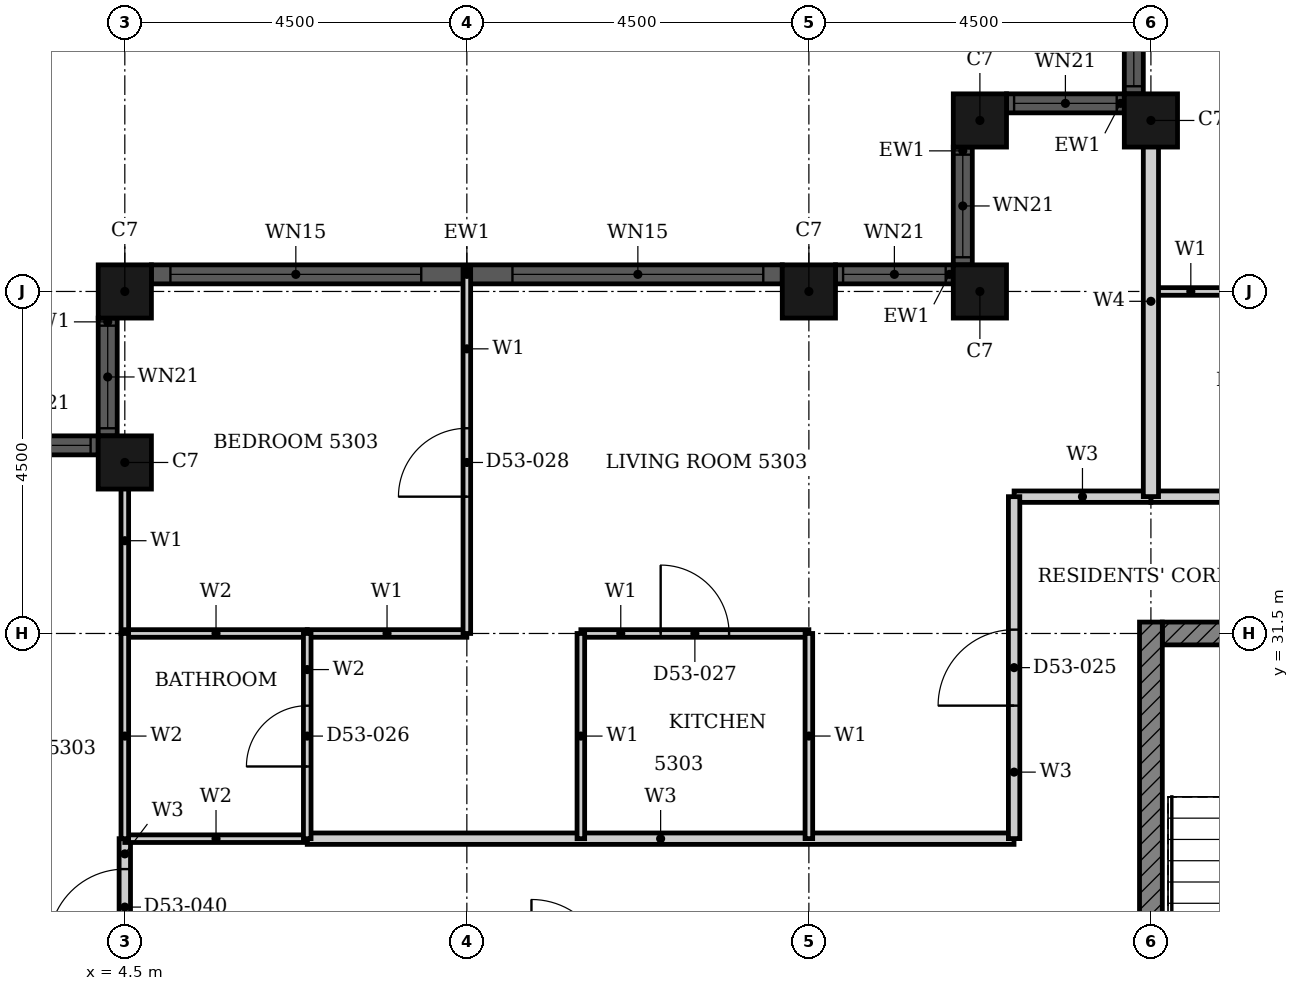
"""IFC4 building model, lengths in metres.
Left out: names, types, materials, properties, quantities, classifications, styles, units other than length and angle.
Written with IfcOpenShell. Run it as: python <this file> out.ifc"""

import sys

from ifc_helpers import new_model, si_unit, direction, frame, frame_2d, origin, origin_2d, place, context, subcontext, project, spatial, rectangle, hollow_rectangle, extrude, element, fill, save


model = new_model("IFC4")
c1 = context("Model", 3, precision=1e-05, world=origin(), true_north=direction((0.0, 1.0)))
c2 = subcontext(c1, "Body", "Model", "MODEL_VIEW")
j1 = project(units=[si_unit("LENGTHUNIT", "METRE"), si_unit("PLANEANGLEUNIT", "RADIAN")], contexts=[c1])
p1 = place(None, origin())
s1 = spatial("IfcSite", under=j1, at=p1, CompositionType="ELEMENT")
p2 = place(p1, origin())
s2 = spatial("IfcBuilding", under=s1, at=p2, CompositionType="ELEMENT")
p3 = place(p2, frame((0.0, 0.0, 210.9)))
s3 = spatial("IfcBuildingStorey", under=s2, at=p3, CompositionType="ELEMENT", Elevation=210.9)
for number, where, z_axis, x_axis in (
    (1, (18.0, 38.25, 0.0), (0.0, 0.0, 1.0), (1.0, 0.0, 0.0)),
    (2, (15.75, 38.25, 0.0), (0.0, 0.0, 1.0), (1.0, 0.0, 0.0)),
    (3, (15.75, 36.0, 0.0), (0.0, 0.0, 1.0), (1.0, 0.0, 0.0)),
    (4, (13.5, 36.0, 0.0), (0.0, 0.0, 1.0), (1.0, 0.0, 0.0)),
    (5, (4.5, 36.0, 0.0), (0.0, 0.0, 1.0), (1.0, 0.0, 0.0)),
    (6, (4.5, 33.75, 0.0), (0.0, 0.0, 1.0), (1.0, 0.0, 0.0)),
):
    element("IfcColumn", number, at=place(p3, frame(where, z_axis=z_axis, x_axis=x_axis)), inside=s3, PredefinedType="COLUMN", context=c2, shape_type="SweptSolid", body=[
        extrude(hollow_rectangle(XDim=0.7, YDim=0.7, WallThickness=0.022, at=origin_2d()), origin(), (0.0, 0.0, 1.0), 3.7),
    ])
p4 = place(p3, frame((17.775, 40.15, 0.0), z_axis=(0.0, 0.0, 1.0), x_axis=(0.0, -1.0, 0.0)))
e7 = element("IfcWall", 7, at=p4, inside=s3, PredefinedType="SOLIDWALL", context=c2, shape_type="SweptSolid", body=[
    extrude(rectangle(XDim=1.55, YDim=0.25, at=frame_2d((0.775, 0.0))), origin(), (0.0, 0.0, 1.0), 3.7),
])
p5 = place(p4, frame((0.1, 0.0, 0.9)))
e8 = element("IfcOpeningElement", 8, at=p5, cuts=e7, PredefinedType="OPENING", context=c2, shape_type="SweptSolid", body=[
    extrude(rectangle(XDim=1.35, YDim=1.85, at=frame_2d((0.675, 0.925))), frame((0.0, 0.135, 0.0), z_axis=(0.0, -1.0, 0.0), x_axis=(1.0, 0.0, 0.0)), (0.0, 0.0, 1.0), 0.27),
])
p6 = place(p3, frame((17.65, 38.475, 0.0), z_axis=(0.0, 0.0, 1.0), x_axis=(-1.0, 0.0, 0.0)))
e9 = element("IfcWall", 9, at=p6, inside=s3, PredefinedType="SOLIDWALL", context=c2, shape_type="SweptSolid", body=[
    extrude(rectangle(XDim=1.55, YDim=0.25, at=frame_2d((0.775, 0.0))), origin(), (0.0, 0.0, 1.0), 3.7),
])
p7 = place(p6, frame((0.1, 0.0, 0.9)))
e10 = element("IfcOpeningElement", 10, at=p7, cuts=e9, PredefinedType="OPENING", context=c2, shape_type="SweptSolid", body=[
    extrude(rectangle(XDim=1.35, YDim=1.85, at=frame_2d((0.675, 0.925))), frame((0.0, 0.135, 0.0), z_axis=(0.0, -1.0, 0.0), x_axis=(1.0, 0.0, 0.0)), (0.0, 0.0, 1.0), 0.27),
])
p8 = place(p3, frame((15.525, 37.9, 0.0), z_axis=(0.0, 0.0, 1.0), x_axis=(0.0, -1.0, 0.0)))
e11 = element("IfcWall", 11, at=p8, inside=s3, PredefinedType="SOLIDWALL", context=c2, shape_type="SweptSolid", body=[
    extrude(rectangle(XDim=1.55, YDim=0.25, at=frame_2d((0.775, 0.0))), origin(), (0.0, 0.0, 1.0), 3.7),
])
p9 = place(p8, frame((0.1, 0.0, 0.9)))
e12 = element("IfcOpeningElement", 12, at=p9, cuts=e11, PredefinedType="OPENING", context=c2, shape_type="SweptSolid", body=[
    extrude(rectangle(XDim=1.35, YDim=1.85, at=frame_2d((0.675, 0.925))), frame((0.0, 0.135, 0.0), z_axis=(0.0, -1.0, 0.0), x_axis=(1.0, 0.0, 0.0)), (0.0, 0.0, 1.0), 0.27),
])
p10 = place(p3, frame((15.4, 36.225, 0.0), z_axis=(0.0, 0.0, 1.0), x_axis=(-1.0, 0.0, 0.0)))
e13 = element("IfcWall", 13, at=p10, inside=s3, PredefinedType="SOLIDWALL", context=c2, shape_type="SweptSolid", body=[
    extrude(rectangle(XDim=1.55, YDim=0.25, at=frame_2d((0.775, 0.0))), origin(), (0.0, 0.0, 1.0), 3.7),
])
p11 = place(p10, frame((0.1, 0.0, 0.9)))
e14 = element("IfcOpeningElement", 14, at=p11, cuts=e13, PredefinedType="OPENING", context=c2, shape_type="SweptSolid", body=[
    extrude(rectangle(XDim=1.35, YDim=1.85, at=frame_2d((0.675, 0.925))), frame((0.0, 0.135, 0.0), z_axis=(0.0, -1.0, 0.0), x_axis=(1.0, 0.0, 0.0)), (0.0, 0.0, 1.0), 0.27),
])
p12 = place(p3, frame((13.15, 36.225, 0.0), z_axis=(0.0, 0.0, 1.0), x_axis=(-1.0, 0.0, 0.0)))
e15 = element("IfcWall", 15, at=p12, inside=s3, PredefinedType="SOLIDWALL", context=c2, shape_type="SweptSolid", body=[
    extrude(rectangle(XDim=8.3, YDim=0.25, at=frame_2d((4.15, 0.0))), origin(), (0.0, 0.0, 1.0), 3.7),
])
p13 = place(p12, frame((0.25, 0.0, 0.45)))
e16 = element("IfcOpeningElement", 16, at=p13, cuts=e15, PredefinedType="OPENING", context=c2, shape_type="SweptSolid", body=[
    extrude(rectangle(XDim=3.3, YDim=2.3, at=frame_2d((1.65, 1.15))), frame((0.0, 0.135, 0.0), z_axis=(0.0, -1.0, 0.0), x_axis=(1.0, 0.0, 0.0)), (0.0, 0.0, 1.0), 0.27),
])
p14 = place(p12, frame((4.75, 0.0, 0.45)))
e17 = element("IfcOpeningElement", 17, at=p14, cuts=e15, PredefinedType="OPENING", context=c2, shape_type="SweptSolid", body=[
    extrude(rectangle(XDim=3.3, YDim=2.3, at=frame_2d((1.65, 1.15))), frame((0.0, 0.135, 0.0), z_axis=(0.0, -1.0, 0.0), x_axis=(1.0, 0.0, 0.0)), (0.0, 0.0, 1.0), 0.27),
])
p15 = place(p3, frame((4.275, 35.65, 0.0), z_axis=(0.0, 0.0, 1.0), x_axis=(0.0, -1.0, 0.0)))
e18 = element("IfcWall", 18, at=p15, inside=s3, PredefinedType="SOLIDWALL", context=c2, shape_type="SweptSolid", body=[
    extrude(rectangle(XDim=1.55, YDim=0.25, at=frame_2d((0.775, 0.0))), origin(), (0.0, 0.0, 1.0), 3.7),
])
p16 = place(p15, frame((0.1, 0.0, 0.9)))
e19 = element("IfcOpeningElement", 19, at=p16, cuts=e18, PredefinedType="OPENING", context=c2, shape_type="SweptSolid", body=[
    extrude(rectangle(XDim=1.35, YDim=1.85, at=frame_2d((0.675, 0.925))), frame((0.0, 0.135, 0.0), z_axis=(0.0, -1.0, 0.0), x_axis=(1.0, 0.0, 0.0)), (0.0, 0.0, 1.0), 0.27),
])
p17 = place(p3, frame((4.15, 33.975, 0.0), z_axis=(0.0, 0.0, 1.0), x_axis=(-1.0, 0.0, 0.0)))
e20 = element("IfcWall", 20, at=p17, inside=s3, PredefinedType="SOLIDWALL", context=c2, shape_type="SweptSolid", body=[
    extrude(rectangle(XDim=1.55, YDim=0.25, at=frame_2d((0.775, 0.0))), origin(), (0.0, 0.0, 1.0), 3.7),
])
p18 = place(p17, frame((0.1, 0.0, 0.9)))
e21 = element("IfcOpeningElement", 21, at=p18, cuts=e20, PredefinedType="OPENING", context=c2, shape_type="SweptSolid", body=[
    extrude(rectangle(XDim=1.35, YDim=1.85, at=frame_2d((0.675, 0.925))), frame((0.0, 0.135, 0.0), z_axis=(0.0, -1.0, 0.0), x_axis=(1.0, 0.0, 0.0)), (0.0, 0.0, 1.0), 0.27),
])
p19 = place(p3, frame((18.15, 31.5, 0.0), z_axis=(0.0, 0.0, 1.0), x_axis=(1.0, 0.0, 0.0)))
e22 = element("IfcWall", 22, at=p19, inside=s3, PredefinedType="SHEAR", context=c2, shape_type="SweptSolid", body=[
    extrude(rectangle(XDim=9.368, YDim=0.3, at=frame_2d((4.684, 0.0))), origin(), (0.0, 0.0, 1.0), 3.4),
])
p20 = place(p19, frame((4.736, 0.0, 0.0)))
e23 = element("IfcOpeningElement", 23, at=p20, cuts=e22, PredefinedType="OPENING", context=c2, shape_type="SweptSolid", body=[
    extrude(rectangle(XDim=1.8, YDim=2.1, at=frame_2d((0.9, 1.05))), frame((0.0, 0.16, 0.0), z_axis=(0.0, -1.0, 0.0), x_axis=(1.0, 0.0, 0.0)), (0.0, 0.0, 1.0), 0.32),
])
p21 = place(p3, frame((18.0, 22.35, 0.0), z_axis=(0.0, 0.0, 1.0), x_axis=(0.0, 1.0, 0.0)))
e24 = element("IfcWall", 24, at=p21, inside=s3, PredefinedType="SHEAR", context=c2, shape_type="SweptSolid", body=[
    extrude(rectangle(XDim=9.3, YDim=0.3, at=frame_2d((4.65, 0.0))), origin(), (0.0, 0.0, 1.0), 3.4),
])
p22 = place(p3, frame((6.9, 28.8, 0.0), z_axis=(0.0, 0.0, 1.0), x_axis=(1.0, 0.0, 0.0)))
e25 = element("IfcWall", 25, at=p22, inside=s3, PredefinedType="PARTITIONING", context=c2, shape_type="SweptSolid", body=[
    extrude(rectangle(XDim=9.299, YDim=0.15, at=frame_2d((4.649, 0.0))), origin(), (0.0, 0.0, 1.0), 3.4),
])
p23 = place(p3, frame((18.0, 33.3, 0.0), z_axis=(0.0, 0.0, 1.0), x_axis=(1.0, 0.0, 0.0)))
e26 = element("IfcWall", 26, at=p23, inside=s3, PredefinedType="PARTITIONING", context=c2, shape_type="SweptSolid", body=[
    extrude(rectangle(XDim=6.6, YDim=0.15, at=frame_2d((3.3, 0.0))), origin(), (0.0, 0.0, 1.0), 3.4),
])
p24 = place(p23, frame((4.3, 0.0, 0.0)))
e27 = element("IfcOpeningElement", 27, at=p24, cuts=e26, PredefinedType="OPENING", context=c2, shape_type="SweptSolid", body=[
    extrude(rectangle(XDim=1.0, YDim=2.2, at=frame_2d((0.5, 1.1))), frame((0.0, 0.085, 0.0), z_axis=(0.0, -1.0, 0.0), x_axis=(1.0, 0.0, 0.0)), (0.0, 0.0, 1.0), 0.17),
])
p25 = place(p3, frame((16.2, 33.3, 0.0), z_axis=(0.0, 0.0, 1.0), x_axis=(1.0, 0.0, 0.0)))
e28 = element("IfcWall", 28, at=p25, inside=s3, PredefinedType="PARTITIONING", context=c2, shape_type="SweptSolid", body=[
    extrude(rectangle(XDim=1.799, YDim=0.15, at=frame_2d((0.899, 0.0))), origin(), (0.0, 0.0, 1.0), 3.4),
])
p26 = place(p3, frame((16.2, 28.801, 0.0), z_axis=(0.0, 0.0, 1.0), x_axis=(0.0, 1.0, 0.0)))
e29 = element("IfcWall", 29, at=p26, inside=s3, PredefinedType="PARTITIONING", context=c2, shape_type="SweptSolid", body=[
    extrude(rectangle(XDim=4.499, YDim=0.15, at=frame_2d((2.25, 0.0))), origin(), (0.0, 0.0, 1.0), 3.4),
])
p27 = place(p26, frame((1.75, 0.0, 0.0)))
e30 = element("IfcOpeningElement", 30, at=p27, cuts=e29, PredefinedType="OPENING", context=c2, shape_type="SweptSolid", body=[
    extrude(rectangle(XDim=1.0, YDim=2.2, at=frame_2d((0.5, 1.1))), frame((0.0, 0.085, 0.0), z_axis=(0.0, -1.0, 0.0), x_axis=(1.0, 0.0, 0.0)), (0.0, 0.0, 1.0), 0.17),
])
p28 = place(p3, frame((4.5, 27.0, 0.0), z_axis=(0.0, 0.0, 1.0), x_axis=(0.0, 1.0, 0.0)))
e31 = element("IfcWall", 31, at=p28, inside=s3, PredefinedType="PARTITIONING", context=c2, shape_type="SweptSolid", body=[
    extrude(rectangle(XDim=1.8, YDim=0.15, at=frame_2d((0.9, 0.0))), origin(), (0.0, 0.0, 1.0), 3.4),
])
p29 = place(p28, frame((0.4, 0.0, 0.0)))
e32 = element("IfcOpeningElement", 32, at=p29, cuts=e31, PredefinedType="OPENING", context=c2, shape_type="SweptSolid", body=[
    extrude(rectangle(XDim=1.0, YDim=2.1, at=frame_2d((0.5, 1.05))), frame((0.0, 0.085, 0.0), z_axis=(0.0, -1.0, 0.0), x_axis=(1.0, 0.0, 0.0)), (0.0, 0.0, 1.0), 0.17),
])
p30 = place(p3, frame((6.9, 31.5, 0.0), z_axis=(0.0, 0.0, 1.0), x_axis=(1.0, 0.0, 0.0)))
e33 = element("IfcWall", 33, at=p30, inside=s3, PredefinedType="PARTITIONING", context=c2, shape_type="SweptSolid", body=[
    extrude(rectangle(XDim=2.1, YDim=0.1, at=frame_2d((1.05, 0.0))), origin(), (0.0, 0.0, 1.0), 2.68),
])
p31 = place(p3, frame((10.5, 31.5, 0.0), z_axis=(0.0, 0.0, 1.0), x_axis=(1.0, 0.0, 0.0)))
e34 = element("IfcWall", 34, at=p31, inside=s3, PredefinedType="PARTITIONING", context=c2, shape_type="SweptSolid", body=[
    extrude(rectangle(XDim=3.0, YDim=0.1, at=frame_2d((1.5, 0.0))), origin(), (0.0, 0.0, 1.0), 2.68),
])
p32 = place(p31, frame((1.05, 0.0, 0.0)))
e35 = element("IfcOpeningElement", 35, at=p32, cuts=e34, PredefinedType="OPENING", context=c2, shape_type="SweptSolid", body=[
    extrude(rectangle(XDim=0.9, YDim=2.1, at=frame_2d((0.45, 1.05))), frame((0.0, 0.06, 0.0), z_axis=(0.0, -1.0, 0.0), x_axis=(1.0, 0.0, 0.0)), (0.0, 0.0, 1.0), 0.12),
])
p33 = place(p3, frame((18.0, 36.0, 0.0), z_axis=(0.0, 0.0, 1.0), x_axis=(1.0, 0.0, 0.0)))
e36 = element("IfcWall", 36, at=p33, inside=s3, PredefinedType="PARTITIONING", context=c2, shape_type="SweptSolid", body=[
    extrude(rectangle(XDim=3.0, YDim=0.1, at=frame_2d((1.5, 0.0))), origin(), (0.0, 0.0, 1.0), 3.4),
])
p34 = place(p33, frame((1.05, 0.0, 0.0)))
e37 = element("IfcOpeningElement", 37, at=p34, cuts=e36, PredefinedType="OPENING", context=c2, shape_type="SweptSolid", body=[
    extrude(rectangle(XDim=0.9, YDim=2.1, at=frame_2d((0.45, 1.05))), frame((0.0, 0.06, 0.0), z_axis=(0.0, -1.0, 0.0), x_axis=(1.0, 0.0, 0.0)), (0.0, 0.0, 1.0), 0.12),
])
p35 = place(p3, frame((10.5, 28.8, 0.0), z_axis=(0.0, 0.0, 1.0), x_axis=(0.0, 1.0, 0.0)))
e38 = element("IfcWall", 38, at=p35, inside=s3, PredefinedType="PARTITIONING", context=c2, shape_type="SweptSolid", body=[
    extrude(rectangle(XDim=2.7, YDim=0.1, at=frame_2d((1.35, 0.0))), origin(), (0.0, 0.0, 1.0), 3.4),
])
p36 = place(p3, frame((13.5, 28.801, 0.0), z_axis=(0.0, 0.0, 1.0), x_axis=(0.0, 1.0, 0.0)))
e39 = element("IfcWall", 39, at=p36, inside=s3, PredefinedType="PARTITIONING", context=c2, shape_type="SweptSolid", body=[
    extrude(rectangle(XDim=2.699, YDim=0.1, at=frame_2d((1.35, 0.0))), origin(), (0.0, 0.0, 1.0), 2.48),
])
p37 = place(p3, frame((4.5, 31.501, 0.0), z_axis=(0.0, 0.0, 1.0), x_axis=(0.0, 1.0, 0.0)))
e40 = element("IfcWall", 40, at=p37, inside=s3, PredefinedType="PARTITIONING", context=c2, shape_type="SweptSolid", body=[
    extrude(rectangle(XDim=2.439, YDim=0.1, at=frame_2d((1.219, 0.0))), origin(), (0.0, 0.0, 1.0), 3.4),
])
p38 = place(p3, frame((9.0, 31.5, 0.0), z_axis=(0.0, 0.0, 1.0), x_axis=(0.0, 1.0, 0.0)))
e41 = element("IfcWall", 41, at=p38, inside=s3, PredefinedType="PARTITIONING", context=c2, shape_type="SweptSolid", body=[
    extrude(rectangle(XDim=4.79, YDim=0.1, at=frame_2d((2.395, 0.0))), origin(), (0.0, 0.0, 1.0), 3.4),
])
p39 = place(p38, frame((1.8, 0.0, 0.0)))
e42 = element("IfcOpeningElement", 42, at=p39, cuts=e41, PredefinedType="OPENING", context=c2, shape_type="SweptSolid", body=[
    extrude(rectangle(XDim=0.9, YDim=2.1, at=frame_2d((0.45, 1.05))), frame((0.0, 0.06, 0.0), z_axis=(0.0, -1.0, 0.0), x_axis=(1.0, 0.0, 0.0)), (0.0, 0.0, 1.0), 0.12),
])
p40 = place(p3, frame((18.0, 33.301, 0.0), z_axis=(0.0, 0.0, 1.0), x_axis=(0.0, 1.0, 0.0)))
e43 = element("IfcWall", 43, at=p40, inside=s3, PredefinedType="PARTITIONING", context=c2, shape_type="SweptSolid", body=[
    extrude(rectangle(XDim=5.139, YDim=0.2, at=frame_2d((2.569, 0.0))), origin(), (0.0, 0.0, 1.0), 3.4),
])
p41 = place(p3, frame((4.5, 28.8, 0.0), z_axis=(0.0, 0.0, 1.0), x_axis=(1.0, 0.0, 0.0)))
e44 = element("IfcWall", 44, at=p41, inside=s3, PredefinedType="PARTITIONING", context=c2, shape_type="SweptSolid", body=[
    extrude(rectangle(XDim=2.4, YDim=0.1, at=frame_2d((1.2, 0.0))), origin(), (0.0, 0.0, 1.0), 3.4),
])
p42 = place(p3, frame((4.5, 31.5, 0.0), z_axis=(0.0, 0.0, 1.0), x_axis=(1.0, 0.0, 0.0)))
e45 = element("IfcWall", 45, at=p42, inside=s3, PredefinedType="PARTITIONING", context=c2, shape_type="SweptSolid", body=[
    extrude(rectangle(XDim=2.4, YDim=0.1, at=frame_2d((1.2, 0.0))), origin(), (0.0, 0.0, 1.0), 2.68),
])
p43 = place(p3, frame((4.5, 28.8, 0.0), z_axis=(0.0, 0.0, 1.0), x_axis=(0.0, 1.0, 0.0)))
e46 = element("IfcWall", 46, at=p43, inside=s3, PredefinedType="PARTITIONING", context=c2, shape_type="SweptSolid", body=[
    extrude(rectangle(XDim=2.7, YDim=0.1, at=frame_2d((1.35, 0.0))), origin(), (0.0, 0.0, 1.0), 3.4),
])
p44 = place(p3, frame((6.9, 28.8, 0.0), z_axis=(0.0, 0.0, 1.0), x_axis=(0.0, 1.0, 0.0)))
e47 = element("IfcWall", 47, at=p44, inside=s3, PredefinedType="PARTITIONING", context=c2, shape_type="SweptSolid", body=[
    extrude(rectangle(XDim=2.7, YDim=0.1, at=frame_2d((1.35, 0.0))), origin(), (0.0, 0.0, 1.0), 3.4),
])
p45 = place(p44, frame((0.95, 0.0, 0.0)))
e48 = element("IfcOpeningElement", 48, at=p45, cuts=e47, PredefinedType="OPENING", context=c2, shape_type="SweptSolid", body=[
    extrude(rectangle(XDim=0.8, YDim=2.1, at=frame_2d((0.4, 1.05))), frame((0.0, 0.06, 0.0), z_axis=(0.0, -1.0, 0.0), x_axis=(1.0, 0.0, 0.0)), (0.0, 0.0, 1.0), 0.12),
])
p46 = place(p5, origin())
e49 = element("IfcWindow", 49, at=p46, inside=s3, PartitioningType="SINGLE_PANEL", PredefinedType="WINDOW", context=c2, shape_type="SweptSolid", body=[
    extrude(rectangle(XDim=1.35, YDim=1.85, at=frame_2d((0.675, 0.925))), frame((0.0, 0.03, 0.0), z_axis=(0.0, -1.0, 0.0), x_axis=(1.0, 0.0, 0.0)), (0.0, 0.0, 1.0), 0.06),
])
fill(e8, e49)
p47 = place(p7, origin())
e50 = element("IfcWindow", 50, at=p47, inside=s3, PartitioningType="SINGLE_PANEL", PredefinedType="WINDOW", context=c2, shape_type="SweptSolid", body=[
    extrude(rectangle(XDim=1.35, YDim=1.85, at=frame_2d((0.675, 0.925))), frame((0.0, 0.03, 0.0), z_axis=(0.0, -1.0, 0.0), x_axis=(1.0, 0.0, 0.0)), (0.0, 0.0, 1.0), 0.06),
])
fill(e10, e50)
p48 = place(p9, origin())
e51 = element("IfcWindow", 51, at=p48, inside=s3, PartitioningType="SINGLE_PANEL", PredefinedType="WINDOW", context=c2, shape_type="SweptSolid", body=[
    extrude(rectangle(XDim=1.35, YDim=1.85, at=frame_2d((0.675, 0.925))), frame((0.0, 0.03, 0.0), z_axis=(0.0, -1.0, 0.0), x_axis=(1.0, 0.0, 0.0)), (0.0, 0.0, 1.0), 0.06),
])
fill(e12, e51)
p49 = place(p11, origin())
e52 = element("IfcWindow", 52, at=p49, inside=s3, PartitioningType="SINGLE_PANEL", PredefinedType="WINDOW", context=c2, shape_type="SweptSolid", body=[
    extrude(rectangle(XDim=1.35, YDim=1.85, at=frame_2d((0.675, 0.925))), frame((0.0, 0.03, 0.0), z_axis=(0.0, -1.0, 0.0), x_axis=(1.0, 0.0, 0.0)), (0.0, 0.0, 1.0), 0.06),
])
fill(e14, e52)
p50 = place(p13, origin())
e53 = element("IfcWindow", 53, at=p50, inside=s3, PartitioningType="SINGLE_PANEL", PredefinedType="WINDOW", context=c2, shape_type="SweptSolid", body=[
    extrude(rectangle(XDim=3.3, YDim=2.3, at=frame_2d((1.65, 1.15))), frame((0.0, 0.03, 0.0), z_axis=(0.0, -1.0, 0.0), x_axis=(1.0, 0.0, 0.0)), (0.0, 0.0, 1.0), 0.06),
])
fill(e16, e53)
p51 = place(p14, origin())
e54 = element("IfcWindow", 54, at=p51, inside=s3, PartitioningType="SINGLE_PANEL", PredefinedType="WINDOW", context=c2, shape_type="SweptSolid", body=[
    extrude(rectangle(XDim=3.3, YDim=2.3, at=frame_2d((1.65, 1.15))), frame((0.0, 0.03, 0.0), z_axis=(0.0, -1.0, 0.0), x_axis=(1.0, 0.0, 0.0)), (0.0, 0.0, 1.0), 0.06),
])
fill(e17, e54)
p52 = place(p16, origin())
e55 = element("IfcWindow", 55, at=p52, inside=s3, PartitioningType="SINGLE_PANEL", PredefinedType="WINDOW", context=c2, shape_type="SweptSolid", body=[
    extrude(rectangle(XDim=1.35, YDim=1.85, at=frame_2d((0.675, 0.925))), frame((0.0, 0.03, 0.0), z_axis=(0.0, -1.0, 0.0), x_axis=(1.0, 0.0, 0.0)), (0.0, 0.0, 1.0), 0.06),
])
fill(e19, e55)
p53 = place(p18, origin())
e56 = element("IfcWindow", 56, at=p53, inside=s3, PartitioningType="SINGLE_PANEL", PredefinedType="WINDOW", context=c2, shape_type="SweptSolid", body=[
    extrude(rectangle(XDim=1.35, YDim=1.85, at=frame_2d((0.675, 0.925))), frame((0.0, 0.03, 0.0), z_axis=(0.0, -1.0, 0.0), x_axis=(1.0, 0.0, 0.0)), (0.0, 0.0, 1.0), 0.06),
])
fill(e21, e56)
p54 = place(p27, origin())
e57 = element("IfcDoor", 57, at=p54, inside=s3, OperationType="SINGLE_SWING_LEFT", PredefinedType="DOOR", context=c2, shape_type="SweptSolid", body=[
    extrude(rectangle(XDim=1.0, YDim=2.2, at=frame_2d((0.5, 1.1))), frame((0.0, 0.025, 0.0), z_axis=(0.0, -1.0, 0.0), x_axis=(1.0, 0.0, 0.0)), (0.0, 0.0, 1.0), 0.05),
])
fill(e30, e57)
p55 = place(p45, origin())
e58 = element("IfcDoor", 58, at=p55, inside=s3, OperationType="SINGLE_SWING_LEFT", PredefinedType="DOOR", context=c2, shape_type="SweptSolid", body=[
    extrude(rectangle(XDim=0.8, YDim=2.1, at=frame_2d((0.4, 1.05))), frame((0.0, 0.025, 0.0), z_axis=(0.0, -1.0, 0.0), x_axis=(1.0, 0.0, 0.0)), (0.0, 0.0, 1.0), 0.05),
])
fill(e48, e58)
p56 = place(p32, origin())
e59 = element("IfcDoor", 59, at=p56, inside=s3, OperationType="SINGLE_SWING_LEFT", PredefinedType="DOOR", context=c2, shape_type="SweptSolid", body=[
    extrude(rectangle(XDim=0.9, YDim=2.1, at=frame_2d((0.45, 1.05))), frame((0.0, 0.025, 0.0), z_axis=(0.0, -1.0, 0.0), x_axis=(1.0, 0.0, 0.0)), (0.0, 0.0, 1.0), 0.05),
])
fill(e35, e59)
p57 = place(p39, origin())
e60 = element("IfcDoor", 60, at=p57, inside=s3, OperationType="SINGLE_SWING_RIGHT", PredefinedType="DOOR", context=c2, shape_type="SweptSolid", body=[
    extrude(rectangle(XDim=0.9, YDim=2.1, at=frame_2d((0.45, 1.05))), frame((0.0, 0.025, 0.0), z_axis=(0.0, -1.0, 0.0), x_axis=(1.0, 0.0, 0.0)), (0.0, 0.0, 1.0), 0.05),
])
fill(e42, e60)
p58 = place(p29, origin())
e61 = element("IfcDoor", 61, at=p58, inside=s3, OperationType="SINGLE_SWING_LEFT", PredefinedType="DOOR", context=c2, shape_type="SweptSolid", body=[
    extrude(rectangle(XDim=1.0, YDim=2.1, at=frame_2d((0.5, 1.05))), frame((0.0, 0.025, 0.0), z_axis=(0.0, -1.0, 0.0), x_axis=(1.0, 0.0, 0.0)), (0.0, 0.0, 1.0), 0.05),
])
fill(e32, e61)
save(model, sys.argv[1])
